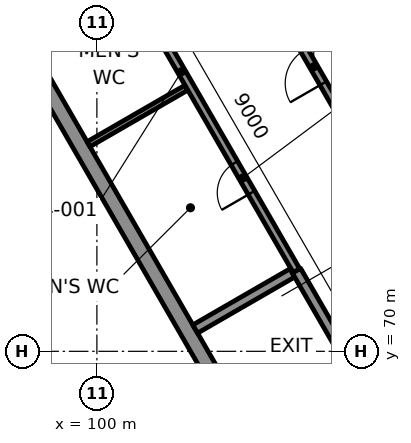
"""IFC4 building model, lengths in metres.
Left out: names, types, materials, properties, quantities, classifications, styles, units other than length and angle.
Written with IfcOpenShell. Run it as: python <this file> out.ifc"""

import sys

from ifc_helpers import new_model, si_unit, direction, frame, frame_2d, origin, place, context, subcontext, project, spatial, rectangle, extrude, element, fill, save


model = new_model("IFC4")
c1 = context("Model", 3, precision=1e-05, world=origin(), true_north=direction((0.0, 1.0)))
c2 = subcontext(c1, "Body", "Model", "MODEL_VIEW")
j1 = project(units=[si_unit("LENGTHUNIT", "METRE"), si_unit("PLANEANGLEUNIT", "RADIAN")], contexts=[c1])
p1 = place(None, origin())
s1 = spatial("IfcSite", under=j1, at=p1, CompositionType="ELEMENT")
p2 = place(p1, origin())
s2 = spatial("IfcBuilding", under=s1, at=p2, CompositionType="ELEMENT")
p3 = place(p2, frame((0.0, 0.0, 8.0)))
s3 = spatial("IfcBuildingStorey", under=s2, at=p3, CompositionType="ELEMENT", Elevation=8.0)
p4 = place(p3, frame((107.106, 62.36, 0.0), z_axis=(0.0, 0.0, 1.0), x_axis=(-0.49999992739, 0.866025445706, 0.0)))
e1 = element("IfcWall", 1, at=p4, inside=s3, PredefinedType="SOLIDWALL", context=c2, shape_type="SweptSolid", body=[
    extrude(rectangle(XDim=54.0, YDim=0.4, at=frame_2d((27.0, 0.0))), origin(), (0.0, 0.0, 1.0), 4.24),
])
p5 = place(p3, frame((132.784, 77.185, 0.0), z_axis=(0.0, 0.0, 1.0), x_axis=(-0.49999992739, 0.866025445706, 0.0)))
e2 = element("IfcWall", 2, at=p5, inside=s3, PredefinedType="SOLIDWALL", context=c2, shape_type="SweptSolid", body=[
    extrude(rectangle(XDim=54.0, YDim=0.3, at=frame_2d((27.0, 0.0))), origin(), (0.0, 0.0, 1.0), 4.24),
])
p6 = place(p5, frame((1.9, 0.0, 0.9)))
e3 = element("IfcOpeningElement", 3, at=p6, cuts=e2, PredefinedType="OPENING", context=c2, shape_type="SweptSolid", body=[
    extrude(rectangle(XDim=1.8, YDim=2.4, at=frame_2d((0.9, 1.2))), frame((0.0, 0.16, 0.0), z_axis=(0.0, -1.0, 0.0), x_axis=(1.0, 0.0, 0.0)), (0.0, 0.0, 1.0), 0.32),
])
p7 = place(p5, frame((6.3, 0.0, 0.9)))
e4 = element("IfcOpeningElement", 4, at=p7, cuts=e2, PredefinedType="OPENING", context=c2, shape_type="SweptSolid", body=[
    extrude(rectangle(XDim=1.8, YDim=2.4, at=frame_2d((0.9, 1.2))), frame((0.0, 0.16, 0.0), z_axis=(0.0, -1.0, 0.0), x_axis=(1.0, 0.0, 0.0)), (0.0, 0.0, 1.0), 0.32),
])
p8 = place(p5, frame((10.7, 0.0, 0.9)))
e5 = element("IfcOpeningElement", 5, at=p8, cuts=e2, PredefinedType="OPENING", context=c2, shape_type="SweptSolid", body=[
    extrude(rectangle(XDim=1.8, YDim=2.4, at=frame_2d((0.9, 1.2))), frame((0.0, 0.16, 0.0), z_axis=(0.0, -1.0, 0.0), x_axis=(1.0, 0.0, 0.0)), (0.0, 0.0, 1.0), 0.32),
])
p9 = place(p5, frame((15.1, 0.0, 0.9)))
e6 = element("IfcOpeningElement", 6, at=p9, cuts=e2, PredefinedType="OPENING", context=c2, shape_type="SweptSolid", body=[
    extrude(rectangle(XDim=1.8, YDim=2.4, at=frame_2d((0.9, 1.2))), frame((0.0, 0.16, 0.0), z_axis=(0.0, -1.0, 0.0), x_axis=(1.0, 0.0, 0.0)), (0.0, 0.0, 1.0), 0.32),
])
p10 = place(p5, frame((19.5, 0.0, 0.9)))
e7 = element("IfcOpeningElement", 7, at=p10, cuts=e2, PredefinedType="OPENING", context=c2, shape_type="SweptSolid", body=[
    extrude(rectangle(XDim=1.8, YDim=2.4, at=frame_2d((0.9, 1.2))), frame((0.0, 0.16, 0.0), z_axis=(0.0, -1.0, 0.0), x_axis=(1.0, 0.0, 0.0)), (0.0, 0.0, 1.0), 0.32),
])
p11 = place(p5, frame((23.9, 0.0, 0.9)))
e8 = element("IfcOpeningElement", 8, at=p11, cuts=e2, PredefinedType="OPENING", context=c2, shape_type="SweptSolid", body=[
    extrude(rectangle(XDim=1.8, YDim=2.4, at=frame_2d((0.9, 1.2))), frame((0.0, 0.16, 0.0), z_axis=(0.0, -1.0, 0.0), x_axis=(1.0, 0.0, 0.0)), (0.0, 0.0, 1.0), 0.32),
])
p12 = place(p5, frame((28.3, 0.0, 0.9)))
e9 = element("IfcOpeningElement", 9, at=p12, cuts=e2, PredefinedType="OPENING", context=c2, shape_type="SweptSolid", body=[
    extrude(rectangle(XDim=1.8, YDim=2.4, at=frame_2d((0.9, 1.2))), frame((0.0, 0.16, 0.0), z_axis=(0.0, -1.0, 0.0), x_axis=(1.0, 0.0, 0.0)), (0.0, 0.0, 1.0), 0.32),
])
p13 = place(p5, frame((32.7, 0.0, 0.9)))
e10 = element("IfcOpeningElement", 10, at=p13, cuts=e2, PredefinedType="OPENING", context=c2, shape_type="SweptSolid", body=[
    extrude(rectangle(XDim=1.8, YDim=2.4, at=frame_2d((0.9, 1.2))), frame((0.0, 0.16, 0.0), z_axis=(0.0, -1.0, 0.0), x_axis=(1.0, 0.0, 0.0)), (0.0, 0.0, 1.0), 0.32),
])
p14 = place(p5, frame((37.1, 0.0, 0.9)))
e11 = element("IfcOpeningElement", 11, at=p14, cuts=e2, PredefinedType="OPENING", context=c2, shape_type="SweptSolid", body=[
    extrude(rectangle(XDim=1.8, YDim=2.4, at=frame_2d((0.9, 1.2))), frame((0.0, 0.16, 0.0), z_axis=(0.0, -1.0, 0.0), x_axis=(1.0, 0.0, 0.0)), (0.0, 0.0, 1.0), 0.32),
])
p15 = place(p5, frame((41.5, 0.0, 0.9)))
e12 = element("IfcOpeningElement", 12, at=p15, cuts=e2, PredefinedType="OPENING", context=c2, shape_type="SweptSolid", body=[
    extrude(rectangle(XDim=1.8, YDim=2.4, at=frame_2d((0.9, 1.2))), frame((0.0, 0.16, 0.0), z_axis=(0.0, -1.0, 0.0), x_axis=(1.0, 0.0, 0.0)), (0.0, 0.0, 1.0), 0.32),
])
p16 = place(p5, frame((45.9, 0.0, 0.9)))
e13 = element("IfcOpeningElement", 13, at=p16, cuts=e2, PredefinedType="OPENING", context=c2, shape_type="SweptSolid", body=[
    extrude(rectangle(XDim=1.8, YDim=2.4, at=frame_2d((0.9, 1.2))), frame((0.0, 0.16, 0.0), z_axis=(0.0, -1.0, 0.0), x_axis=(1.0, 0.0, 0.0)), (0.0, 0.0, 1.0), 0.32),
])
p17 = place(p5, frame((50.3, 0.0, 0.9)))
e14 = element("IfcOpeningElement", 14, at=p17, cuts=e2, PredefinedType="OPENING", context=c2, shape_type="SweptSolid", body=[
    extrude(rectangle(XDim=1.8, YDim=2.4, at=frame_2d((0.9, 1.2))), frame((0.0, 0.16, 0.0), z_axis=(0.0, -1.0, 0.0), x_axis=(1.0, 0.0, 0.0)), (0.0, 0.0, 1.0), 0.32),
])
p18 = place(p3, frame((102.587, 70.587, 0.0), z_axis=(0.0, 0.0, 1.0), x_axis=(0.866039495442, 0.49997559174, 0.0)))
e15 = element("IfcWall", 15, at=p18, inside=s3, PredefinedType="SOLIDWALL", context=c2, shape_type="SweptSolid", body=[
    extrude(rectangle(XDim=2.95, YDim=0.25, at=frame_2d((1.475, 0.0))), origin(), (0.0, 0.0, 1.0), 4.24),
])
p19 = place(p3, frame((109.792, 64.257, 0.0), z_axis=(0.0, 0.0, 1.0), x_axis=(-0.499994616197, 0.866028512102, 0.0)))
e16 = element("IfcWall", 16, at=p19, inside=s3, PredefinedType="SOLIDWALL", context=c2, shape_type="SweptSolid", body=[
    extrude(rectangle(XDim=9.085, YDim=0.25, at=frame_2d((4.542, 0.0))), origin(), (0.0, 0.0, 1.0), 4.24),
])
p20 = place(p19, frame((0.2, 0.0, 0.0)))
e17 = element("IfcOpeningElement", 17, at=p20, cuts=e16, PredefinedType="OPENING", context=c2, shape_type="SweptSolid", body=[
    extrude(rectangle(XDim=1.0, YDim=2.1, at=frame_2d((0.5, 1.05))), frame((0.0, 0.135, 0.0), z_axis=(0.0, -1.0, 0.0), x_axis=(1.0, 0.0, 0.0)), (0.0, 0.0, 1.0), 0.27),
])
p21 = place(p3, frame((99.779, 75.45, 0.0), z_axis=(0.0, 0.0, 1.0), x_axis=(0.866017493347, 0.500013701029, 0.0)))
e18 = element("IfcWall", 18, at=p21, inside=s3, PredefinedType="PARTITIONING", context=c2, shape_type="SweptSolid", body=[
    extrude(rectangle(XDim=2.975, YDim=0.15, at=frame_2d((1.488, 0.0))), origin(), (0.0, 0.0, 1.0), 4.24),
])
p22 = place(p3, frame((105.25, 72.125, 0.0), z_axis=(0.0, 0.0, 1.0), x_axis=(-0.499996309931, 0.866027534236, 0.0)))
e19 = element("IfcWall", 19, at=p22, inside=s3, PredefinedType="PARTITIONING", context=c2, shape_type="SweptSolid", body=[
    extrude(rectangle(XDim=12.09, YDim=0.2, at=frame_2d((6.045, 0.0))), origin(), (0.0, 0.0, 1.0), 4.24),
])
p23 = place(p22, frame((2.365, 0.0, 0.0)))
e20 = element("IfcOpeningElement", 20, at=p23, cuts=e19, PredefinedType="OPENING", context=c2, shape_type="SweptSolid", body=[
    extrude(rectangle(XDim=0.9, YDim=2.1, at=frame_2d((0.45, 1.05))), frame((0.0, 0.11, 0.0), z_axis=(0.0, -1.0, 0.0), x_axis=(1.0, 0.0, 0.0)), (0.0, 0.0, 1.0), 0.22),
])
p24 = place(p22, frame((8.365, 0.0, 0.0)))
e21 = element("IfcOpeningElement", 21, at=p24, cuts=e19, PredefinedType="OPENING", context=c2, shape_type="SweptSolid", body=[
    extrude(rectangle(XDim=0.9, YDim=2.1, at=frame_2d((0.45, 1.05))), frame((0.0, 0.11, 0.0), z_axis=(0.0, -1.0, 0.0), x_axis=(1.0, 0.0, 0.0)), (0.0, 0.0, 1.0), 0.22),
])
p25 = place(p3, frame((112.496, 65.725, 0.0), z_axis=(0.0, 0.0, 1.0), x_axis=(-0.499998673217, 0.866026169802, 0.0)))
e22 = element("IfcWall", 22, at=p25, inside=s3, PredefinedType="PARTITIONING", context=c2, shape_type="SweptSolid", body=[
    extrude(rectangle(XDim=53.48, YDim=0.2, at=frame_2d((26.74, 0.0))), origin(), (0.0, 0.0, 1.0), 4.24),
])
p26 = place(p25, frame((13.08, 0.0, 0.0)))
e23 = element("IfcOpeningElement", 23, at=p26, cuts=e22, PredefinedType="OPENING", context=c2, shape_type="SweptSolid", body=[
    extrude(rectangle(XDim=1.0, YDim=2.1, at=frame_2d((0.5, 1.05))), frame((0.0, 0.11, 0.0), z_axis=(0.0, -1.0, 0.0), x_axis=(1.0, 0.0, 0.0)), (0.0, 0.0, 1.0), 0.22),
])
p27 = place(p25, frame((25.88, 0.0, 0.0)))
e24 = element("IfcOpeningElement", 24, at=p27, cuts=e22, PredefinedType="OPENING", context=c2, shape_type="SweptSolid", body=[
    extrude(rectangle(XDim=1.8, YDim=2.1, at=frame_2d((0.9, 1.05))), frame((0.0, 0.11, 0.0), z_axis=(0.0, -1.0, 0.0), x_axis=(1.0, 0.0, 0.0)), (0.0, 0.0, 1.0), 0.22),
])
p28 = place(p25, frame((50.58, 0.0, 0.0)))
e25 = element("IfcOpeningElement", 25, at=p28, cuts=e22, PredefinedType="OPENING", context=c2, shape_type="SweptSolid", body=[
    extrude(rectangle(XDim=1.0, YDim=2.1, at=frame_2d((0.5, 1.05))), frame((0.0, 0.11, 0.0), z_axis=(0.0, -1.0, 0.0), x_axis=(1.0, 0.0, 0.0)), (0.0, 0.0, 1.0), 0.22),
])
p29 = place(p25, frame((44.28, 0.0, 0.0)))
e26 = element("IfcOpeningElement", 26, at=p29, cuts=e22, PredefinedType="OPENING", context=c2, shape_type="SweptSolid", body=[
    extrude(rectangle(XDim=1.0, YDim=2.1, at=frame_2d((0.5, 1.05))), frame((0.0, 0.11, 0.0), z_axis=(0.0, -1.0, 0.0), x_axis=(1.0, 0.0, 0.0)), (0.0, 0.0, 1.0), 0.22),
])
p30 = place(p23, origin())
e27 = element("IfcDoor", 27, at=p30, inside=s3, OperationType="SINGLE_SWING_LEFT", PredefinedType="DOOR", context=c2, shape_type="SweptSolid", body=[
    extrude(rectangle(XDim=0.9, YDim=2.1, at=frame_2d((0.45, 1.05))), frame((0.0, 0.025, 0.0), z_axis=(0.0, -1.0, 0.0), x_axis=(1.0, 0.0, 0.0)), (0.0, 0.0, 1.0), 0.05),
])
fill(e20, e27)
p31 = place(p26, origin())
e28 = element("IfcDoor", 28, at=p31, inside=s3, OperationType="SINGLE_SWING_LEFT", PredefinedType="DOOR", context=c2, shape_type="SweptSolid", body=[
    extrude(rectangle(XDim=1.0, YDim=2.1, at=frame_2d((0.5, 1.05))), frame((0.0, 0.025, 0.0), z_axis=(0.0, -1.0, 0.0), x_axis=(1.0, 0.0, 0.0)), (0.0, 0.0, 1.0), 0.05),
])
fill(e23, e28)
save(model, sys.argv[1])
